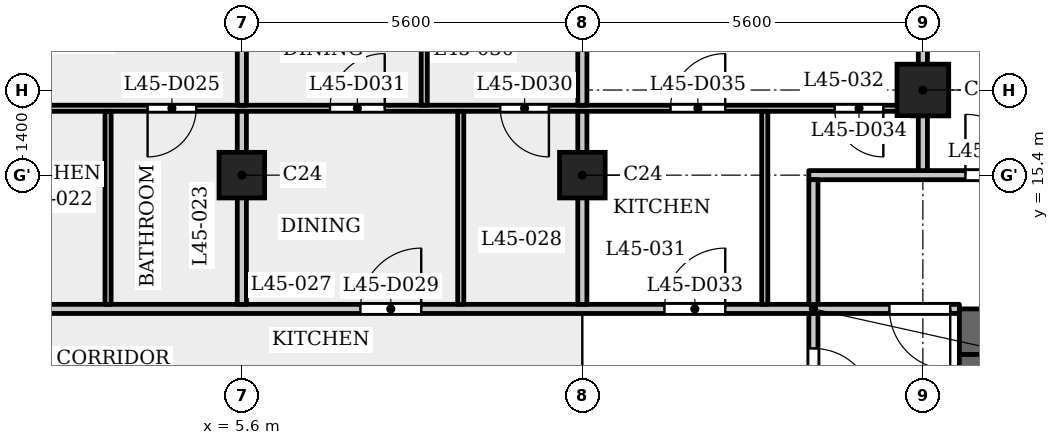
"""IFC4 building model, lengths in metres.
Left out: names, types, materials, properties, quantities, classifications, styles, units other than length and angle.
Written with IfcOpenShell. Run it as: python <this file> out.ifc"""

import sys

from ifc_helpers import new_model, si_unit, direction, frame, frame_2d, origin, origin_2d, place, context, subcontext, project, spatial, rectangle, extrude, element, fill, save


model = new_model("IFC4")
c1 = context("Model", 3, precision=1e-05, world=origin(), true_north=direction((0.0, 1.0)))
c2 = subcontext(c1, "Body", "Model", "MODEL_VIEW")
j1 = project(units=[si_unit("LENGTHUNIT", "METRE"), si_unit("PLANEANGLEUNIT", "RADIAN")], contexts=[c1])
p1 = place(None, origin())
s1 = spatial("IfcSite", under=j1, at=p1, CompositionType="ELEMENT")
p2 = place(p1, origin())
s2 = spatial("IfcBuilding", under=s1, at=p2, CompositionType="ELEMENT")
p3 = place(p2, frame((0.0, 0.0, 174.6)))
s3 = spatial("IfcBuildingStorey", under=s2, at=p3, CompositionType="ELEMENT", Elevation=174.6)
p4 = place(p3, frame((16.8, 16.8, 0.0), z_axis=(0.0, 0.0, 1.0), x_axis=(1.0, 0.0, 0.0)))
e1 = element("IfcColumn", 1, at=p4, inside=s3, PredefinedType="COLUMN", context=c2, shape_type="SweptSolid", body=[
    extrude(rectangle(XDim=0.85, YDim=0.85, at=origin_2d()), origin(), (0.0, 0.0, 1.0), 3.5),
])
for number, where, z_axis, x_axis in (
    (2, (5.6, 15.4, 0.0), (0.0, 0.0, 1.0), (1.0, 0.0, 0.0)),
    (3, (11.2, 15.4, 0.0), (0.0, 0.0, 1.0), (1.0, 0.0, 0.0)),
):
    element("IfcColumn", number, at=place(p3, frame(where, z_axis=z_axis, x_axis=x_axis)), inside=s3, PredefinedType="COLUMN", context=c2, shape_type="SweptSolid", body=[
        extrude(rectangle(XDim=0.75, YDim=0.75, at=origin_2d()), origin(), (0.0, 0.0, 1.0), 3.5),
    ])
p5 = place(p3, frame((17.4, 12.825, 0.0), z_axis=(0.0, 0.0, 1.0), x_axis=(1.0, 0.0, 0.0)))
e4 = element("IfcWall", 4, at=p5, inside=s3, PredefinedType="SHEAR", context=c2, shape_type="SweptSolid", body=[
    extrude(rectangle(XDim=10.4, YDim=0.75, at=frame_2d((5.2, 0.0))), origin(), (0.0, 0.0, 1.0), 3.15),
])
p6 = place(p3, frame((17.6, -12.45, 0.0), z_axis=(0.0, 0.0, 1.0), x_axis=(0.0, 1.0, 0.0)))
e5 = element("IfcWall", 5, at=p6, inside=s3, PredefinedType="SHEAR", context=c2, shape_type="SweptSolid", body=[
    extrude(rectangle(XDim=24.9, YDim=0.4, at=frame_2d((12.45, 0.0))), origin(), (0.0, 0.0, 1.0), 3.15),
])
p7 = place(p6, frame((8.65, 0.0, 0.0)))
e6 = element("IfcOpeningElement", 6, at=p7, cuts=e5, PredefinedType="OPENING", context=c2, shape_type="SweptSolid", body=[
    extrude(rectangle(XDim=0.9, YDim=2.1, at=frame_2d((0.45, 1.05))), frame((0.0, 0.21, 0.0), z_axis=(0.0, -1.0, 0.0), x_axis=(1.0, 0.0, 0.0)), (0.0, 0.0, 1.0), 0.42),
])
p8 = place(p6, frame((15.6, 0.0, 0.0)))
e7 = element("IfcOpeningElement", 7, at=p8, cuts=e5, PredefinedType="OPENING", context=c2, shape_type="SweptSolid", body=[
    extrude(rectangle(XDim=1.1, YDim=2.1, at=frame_2d((0.55, 1.05))), frame((0.0, 0.21, 0.0), z_axis=(0.0, -1.0, 0.0), x_axis=(1.0, 0.0, 0.0)), (0.0, 0.0, 1.0), 0.42),
])
p9 = place(p6, frame((18.0, 0.0, 0.0)))
e8 = element("IfcOpeningElement", 8, at=p9, cuts=e5, PredefinedType="OPENING", context=c2, shape_type="SweptSolid", body=[
    extrude(rectangle(XDim=1.1, YDim=2.1, at=frame_2d((0.55, 1.05))), frame((0.0, 0.21, 0.0), z_axis=(0.0, -1.0, 0.0), x_axis=(1.0, 0.0, 0.0)), (0.0, 0.0, 1.0), 0.42),
])
p10 = place(p6, frame((23.025, 0.0, 0.0)))
e9 = element("IfcOpeningElement", 9, at=p10, cuts=e5, PredefinedType="OPENING", context=c2, shape_type="SweptSolid", body=[
    extrude(rectangle(XDim=1.1, YDim=2.1, at=frame_2d((0.55, 1.05))), frame((0.0, 0.21, 0.0), z_axis=(0.0, -1.0, 0.0), x_axis=(1.0, 0.0, 0.0)), (0.0, 0.0, 1.0), 0.42),
])
p11 = place(p6, frame((0.775, 0.0, 0.0)))
e10 = element("IfcOpeningElement", 10, at=p11, cuts=e5, PredefinedType="OPENING", context=c2, shape_type="SweptSolid", body=[
    extrude(rectangle(XDim=1.1, YDim=2.1, at=frame_2d((0.55, 1.05))), frame((0.0, 0.21, 0.0), z_axis=(0.0, -1.0, 0.0), x_axis=(1.0, 0.0, 0.0)), (0.0, 0.0, 1.0), 0.42),
])
p12 = place(p6, frame((12.925, 0.0, 0.0)))
e11 = element("IfcOpeningElement", 11, at=p12, cuts=e5, PredefinedType="OPENING", context=c2, shape_type="SweptSolid", body=[
    extrude(rectangle(XDim=1.8, YDim=2.1, at=frame_2d((0.9, 1.05))), frame((0.0, 0.21, 0.0), z_axis=(0.0, -1.0, 0.0), x_axis=(1.0, 0.0, 0.0)), (0.0, 0.0, 1.0), 0.42),
])
p13 = place(p3, frame((-17.4, 13.2, 0.0), z_axis=(0.0, 0.0, 1.0), x_axis=(1.0, 0.0, 0.0)))
e12 = element("IfcWall", 12, at=p13, inside=s3, PredefinedType="PARTITIONING", context=c2, shape_type="SweptSolid", body=[
    extrude(rectangle(XDim=34.8, YDim=0.15, at=frame_2d((17.4, 0.0))), origin(), (0.0, 0.0, 1.0), 3.15),
])
p14 = place(p13, frame((0.25, 0.0, 0.0)))
e13 = element("IfcOpeningElement", 13, at=p14, cuts=e12, PredefinedType="OPENING", context=c2, shape_type="SweptSolid", body=[
    extrude(rectangle(XDim=1.0, YDim=2.1, at=frame_2d((0.5, 1.05))), frame((0.0, 0.085, 0.0), z_axis=(0.0, -1.0, 0.0), x_axis=(1.0, 0.0, 0.0)), (0.0, 0.0, 1.0), 0.17),
])
p15 = place(p13, frame((33.65, 0.0, 0.0)))
e14 = element("IfcOpeningElement", 14, at=p15, cuts=e12, PredefinedType="OPENING", context=c2, shape_type="SweptSolid", body=[
    extrude(rectangle(XDim=1.0, YDim=2.1, at=frame_2d((0.5, 1.05))), frame((0.0, 0.085, 0.0), z_axis=(0.0, -1.0, 0.0), x_axis=(1.0, 0.0, 0.0)), (0.0, 0.0, 1.0), 0.17),
])
p16 = place(p13, frame((10.15, 0.0, 0.0)))
e15 = element("IfcOpeningElement", 15, at=p16, cuts=e12, PredefinedType="OPENING", context=c2, shape_type="SweptSolid", body=[
    extrude(rectangle(XDim=1.0, YDim=2.1, at=frame_2d((0.5, 1.05))), frame((0.0, 0.085, 0.0), z_axis=(0.0, -1.0, 0.0), x_axis=(1.0, 0.0, 0.0)), (0.0, 0.0, 1.0), 0.17),
])
p17 = place(p13, frame((15.75, 0.0, 0.0)))
e16 = element("IfcOpeningElement", 16, at=p17, cuts=e12, PredefinedType="OPENING", context=c2, shape_type="SweptSolid", body=[
    extrude(rectangle(XDim=1.0, YDim=2.1, at=frame_2d((0.5, 1.05))), frame((0.0, 0.085, 0.0), z_axis=(0.0, -1.0, 0.0), x_axis=(1.0, 0.0, 0.0)), (0.0, 0.0, 1.0), 0.17),
])
p18 = place(p13, frame((24.95, 0.0, 0.0)))
e17 = element("IfcOpeningElement", 17, at=p18, cuts=e12, PredefinedType="OPENING", context=c2, shape_type="SweptSolid", body=[
    extrude(rectangle(XDim=1.0, YDim=2.1, at=frame_2d((0.5, 1.05))), frame((0.0, 0.085, 0.0), z_axis=(0.0, -1.0, 0.0), x_axis=(1.0, 0.0, 0.0)), (0.0, 0.0, 1.0), 0.17),
])
p19 = place(p13, frame((29.95, 0.0, 0.0)))
e18 = element("IfcOpeningElement", 18, at=p19, cuts=e12, PredefinedType="OPENING", context=c2, shape_type="SweptSolid", body=[
    extrude(rectangle(XDim=1.0, YDim=2.1, at=frame_2d((0.5, 1.05))), frame((0.0, 0.085, 0.0), z_axis=(0.0, -1.0, 0.0), x_axis=(1.0, 0.0, 0.0)), (0.0, 0.0, 1.0), 0.17),
])
p20 = place(p3, frame((14.925, 15.4, 0.0), z_axis=(0.0, 0.0, 1.0), x_axis=(1.0, 0.0, 0.0)))
e19 = element("IfcWall", 19, at=p20, inside=s3, PredefinedType="PARTITIONING", context=c2, shape_type="SweptSolid", body=[
    extrude(rectangle(XDim=12.559, YDim=0.15, at=frame_2d((6.279, 0.0))), origin(), (0.0, 0.0, 1.0), 3.15),
])
p21 = place(p20, frame((2.575, 0.0, 0.0)))
e20 = element("IfcOpeningElement", 20, at=p21, cuts=e19, PredefinedType="OPENING", context=c2, shape_type="SweptSolid", body=[
    extrude(rectangle(XDim=1.0, YDim=2.1, at=frame_2d((0.5, 1.05))), frame((0.0, 0.085, 0.0), z_axis=(0.0, -1.0, 0.0), x_axis=(1.0, 0.0, 0.0)), (0.0, 0.0, 1.0), 0.17),
])
p22 = place(p3, frame((-16.725, 16.5, 0.0), z_axis=(0.0, 0.0, 1.0), x_axis=(1.0, 0.0, 0.0)))
e21 = element("IfcWall", 21, at=p22, inside=s3, PredefinedType="PARTITIONING", context=c2, shape_type="SweptSolid", body=[
    extrude(rectangle(XDim=33.45, YDim=0.1, at=frame_2d((16.725, 0.0))), origin(), (0.0, 0.0, 1.0), 3.15),
])
p23 = place(p22, frame((0.575, 0.0, 0.0)))
e22 = element("IfcOpeningElement", 22, at=p23, cuts=e21, PredefinedType="OPENING", context=c2, shape_type="SweptSolid", body=[
    extrude(rectangle(XDim=0.8, YDim=2.1, at=frame_2d((0.4, 1.05))), frame((0.0, 0.06, 0.0), z_axis=(0.0, -1.0, 0.0), x_axis=(1.0, 0.0, 0.0)), (0.0, 0.0, 1.0), 0.12),
])
p24 = place(p22, frame((3.225, 0.0, 0.0)))
e23 = element("IfcOpeningElement", 23, at=p24, cuts=e21, PredefinedType="OPENING", context=c2, shape_type="SweptSolid", body=[
    extrude(rectangle(XDim=0.9, YDim=2.1, at=frame_2d((0.45, 1.05))), frame((0.0, 0.06, 0.0), z_axis=(0.0, -1.0, 0.0), x_axis=(1.0, 0.0, 0.0)), (0.0, 0.0, 1.0), 0.12),
])
p25 = place(p22, frame((6.775, 0.0, 0.0)))
e24 = element("IfcOpeningElement", 24, at=p25, cuts=e21, PredefinedType="OPENING", context=c2, shape_type="SweptSolid", body=[
    extrude(rectangle(XDim=0.9, YDim=2.1, at=frame_2d((0.45, 1.05))), frame((0.0, 0.06, 0.0), z_axis=(0.0, -1.0, 0.0), x_axis=(1.0, 0.0, 0.0)), (0.0, 0.0, 1.0), 0.12),
])
p26 = place(p22, frame((8.825, 0.0, 0.0)))
e25 = element("IfcOpeningElement", 25, at=p26, cuts=e21, PredefinedType="OPENING", context=c2, shape_type="SweptSolid", body=[
    extrude(rectangle(XDim=0.9, YDim=2.1, at=frame_2d((0.45, 1.05))), frame((0.0, 0.06, 0.0), z_axis=(0.0, -1.0, 0.0), x_axis=(1.0, 0.0, 0.0)), (0.0, 0.0, 1.0), 0.12),
])
p27 = place(p22, frame((20.775, 0.0, 0.0)))
e26 = element("IfcOpeningElement", 26, at=p27, cuts=e21, PredefinedType="OPENING", context=c2, shape_type="SweptSolid", body=[
    extrude(rectangle(XDim=0.8, YDim=2.1, at=frame_2d((0.4, 1.05))), frame((0.0, 0.06, 0.0), z_axis=(0.0, -1.0, 0.0), x_axis=(1.0, 0.0, 0.0)), (0.0, 0.0, 1.0), 0.12),
])
p28 = place(p22, frame((17.325, 0.0, 0.0)))
e27 = element("IfcOpeningElement", 27, at=p28, cuts=e21, PredefinedType="OPENING", context=c2, shape_type="SweptSolid", body=[
    extrude(rectangle(XDim=0.9, YDim=2.1, at=frame_2d((0.45, 1.05))), frame((0.0, 0.06, 0.0), z_axis=(0.0, -1.0, 0.0), x_axis=(1.0, 0.0, 0.0)), (0.0, 0.0, 1.0), 0.12),
])
p29 = place(p22, frame((12.375, 0.0, 0.0)))
e28 = element("IfcOpeningElement", 28, at=p29, cuts=e21, PredefinedType="OPENING", context=c2, shape_type="SweptSolid", body=[
    extrude(rectangle(XDim=0.9, YDim=2.1, at=frame_2d((0.45, 1.05))), frame((0.0, 0.06, 0.0), z_axis=(0.0, -1.0, 0.0), x_axis=(1.0, 0.0, 0.0)), (0.0, 0.0, 1.0), 0.12),
])
p30 = place(p22, frame((14.425, 0.0, 0.0)))
e29 = element("IfcOpeningElement", 29, at=p30, cuts=e21, PredefinedType="OPENING", context=c2, shape_type="SweptSolid", body=[
    extrude(rectangle(XDim=0.9, YDim=2.1, at=frame_2d((0.45, 1.05))), frame((0.0, 0.06, 0.0), z_axis=(0.0, -1.0, 0.0), x_axis=(1.0, 0.0, 0.0)), (0.0, 0.0, 1.0), 0.12),
])
p31 = place(p22, frame((26.575, 0.0, 0.0)))
e30 = element("IfcOpeningElement", 30, at=p31, cuts=e21, PredefinedType="OPENING", context=c2, shape_type="SweptSolid", body=[
    extrude(rectangle(XDim=0.8, YDim=2.1, at=frame_2d((0.4, 1.05))), frame((0.0, 0.06, 0.0), z_axis=(0.0, -1.0, 0.0), x_axis=(1.0, 0.0, 0.0)), (0.0, 0.0, 1.0), 0.12),
])
p32 = place(p22, frame((23.775, 0.0, 0.0)))
e31 = element("IfcOpeningElement", 31, at=p32, cuts=e21, PredefinedType="OPENING", context=c2, shape_type="SweptSolid", body=[
    extrude(rectangle(XDim=0.9, YDim=2.1, at=frame_2d((0.45, 1.05))), frame((0.0, 0.06, 0.0), z_axis=(0.0, -1.0, 0.0), x_axis=(1.0, 0.0, 0.0)), (0.0, 0.0, 1.0), 0.12),
])
p33 = place(p22, frame((32.075, 0.0, 0.0)))
e32 = element("IfcOpeningElement", 32, at=p33, cuts=e21, PredefinedType="OPENING", context=c2, shape_type="SweptSolid", body=[
    extrude(rectangle(XDim=0.8, YDim=2.1, at=frame_2d((0.4, 1.05))), frame((0.0, 0.06, 0.0), z_axis=(0.0, -1.0, 0.0), x_axis=(1.0, 0.0, 0.0)), (0.0, 0.0, 1.0), 0.12),
])
p34 = place(p22, frame((29.375, 0.0, 0.0)))
e33 = element("IfcOpeningElement", 33, at=p34, cuts=e21, PredefinedType="OPENING", context=c2, shape_type="SweptSolid", body=[
    extrude(rectangle(XDim=0.9, YDim=2.1, at=frame_2d((0.45, 1.05))), frame((0.0, 0.06, 0.0), z_axis=(0.0, -1.0, 0.0), x_axis=(1.0, 0.0, 0.0)), (0.0, 0.0, 1.0), 0.12),
])
p35 = place(p3, frame((3.4, 13.275, 0.0), z_axis=(0.0, 0.0, 1.0), x_axis=(0.0, 1.0, 0.0)))
e34 = element("IfcWall", 34, at=p35, inside=s3, PredefinedType="PARTITIONING", context=c2, shape_type="SweptSolid", body=[
    extrude(rectangle(XDim=3.175, YDim=0.1, at=frame_2d((1.587, 0.0))), origin(), (0.0, 0.0, 1.0), 3.15),
])
p36 = place(p3, frame((5.6, 13.275, 0.0), z_axis=(0.0, 0.0, 1.0), x_axis=(0.0, 1.0, 0.0)))
e35 = element("IfcWall", 35, at=p36, inside=s3, PredefinedType="PARTITIONING", context=c2, shape_type="SweptSolid", body=[
    extrude(rectangle(XDim=3.175, YDim=0.15, at=frame_2d((1.587, 0.0))), origin(), (0.0, 0.0, 1.0), 3.15),
])
p37 = place(p3, frame((5.6, 16.55, 0.0), z_axis=(0.0, 0.0, 1.0), x_axis=(0.0, 1.0, 0.0)))
e36 = element("IfcWall", 36, at=p37, inside=s3, PredefinedType="PARTITIONING", context=c2, shape_type="SweptSolid", body=[
    extrude(rectangle(XDim=6.33, YDim=0.15, at=frame_2d((3.165, 0.0))), origin(), (0.0, 0.0, 1.0), 3.15),
])
p38 = place(p3, frame((8.6, 16.55, 0.0), z_axis=(0.0, 0.0, 1.0), x_axis=(0.0, 1.0, 0.0)))
e37 = element("IfcWall", 37, at=p38, inside=s3, PredefinedType="PARTITIONING", context=c2, shape_type="SweptSolid", body=[
    extrude(rectangle(XDim=5.53, YDim=0.1, at=frame_2d((2.765, 0.0))), origin(), (0.0, 0.0, 1.0), 3.15),
])
p39 = place(p38, frame((4.35, 0.0, 0.0)))
e38 = element("IfcOpeningElement", 38, at=p39, cuts=e37, PredefinedType="OPENING", context=c2, shape_type="SweptSolid", body=[
    extrude(rectangle(XDim=0.9, YDim=2.1, at=frame_2d((0.45, 1.05))), frame((0.0, 0.06, 0.0), z_axis=(0.0, -1.0, 0.0), x_axis=(1.0, 0.0, 0.0)), (0.0, 0.0, 1.0), 0.12),
])
p40 = place(p3, frame((9.2, 13.275, 0.0), z_axis=(0.0, 0.0, 1.0), x_axis=(0.0, 1.0, 0.0)))
e39 = element("IfcWall", 39, at=p40, inside=s3, PredefinedType="PARTITIONING", context=c2, shape_type="SweptSolid", body=[
    extrude(rectangle(XDim=3.175, YDim=0.1, at=frame_2d((1.587, 0.0))), origin(), (0.0, 0.0, 1.0), 3.15),
])
p41 = place(p3, frame((11.2, 13.275, 0.0), z_axis=(0.0, 0.0, 1.0), x_axis=(0.0, 1.0, 0.0)))
e40 = element("IfcWall", 40, at=p41, inside=s3, PredefinedType="PARTITIONING", context=c2, shape_type="SweptSolid", body=[
    extrude(rectangle(XDim=3.175, YDim=0.15, at=frame_2d((1.587, 0.0))), origin(), (0.0, 0.0, 1.0), 3.15),
])
p42 = place(p3, frame((11.2, 16.55, 0.0), z_axis=(0.0, 0.0, 1.0), x_axis=(0.0, 1.0, 0.0)))
e41 = element("IfcWall", 41, at=p42, inside=s3, PredefinedType="PARTITIONING", context=c2, shape_type="SweptSolid", body=[
    extrude(rectangle(XDim=6.33, YDim=0.15, at=frame_2d((3.165, 0.0))), origin(), (0.0, 0.0, 1.0), 3.15),
])
p43 = place(p3, frame((14.2, 13.275, 0.0), z_axis=(0.0, 0.0, 1.0), x_axis=(0.0, 1.0, 0.0)))
e42 = element("IfcWall", 42, at=p43, inside=s3, PredefinedType="PARTITIONING", context=c2, shape_type="SweptSolid", body=[
    extrude(rectangle(XDim=3.175, YDim=0.1, at=frame_2d((1.587, 0.0))), origin(), (0.0, 0.0, 1.0), 3.15),
])
p44 = place(p3, frame((15.0, 6.769, 0.0), z_axis=(0.0, 0.0, 1.0), x_axis=(0.0, 1.0, 0.0)))
e43 = element("IfcWall", 43, at=p44, inside=s3, PredefinedType="PARTITIONING", context=c2, shape_type="SweptSolid", body=[
    extrude(rectangle(XDim=6.356, YDim=0.15, at=frame_2d((3.178, 0.0))), origin(), (0.0, 0.0, 1.0), 3.15),
])
p45 = place(p44, frame((4.781, 0.0, 0.0)))
e44 = element("IfcOpeningElement", 44, at=p45, cuts=e43, PredefinedType="OPENING", context=c2, shape_type="SweptSolid", body=[
    extrude(rectangle(XDim=1.0, YDim=2.1, at=frame_2d((0.5, 1.05))), frame((0.0, 0.085, 0.0), z_axis=(0.0, -1.0, 0.0), x_axis=(1.0, 0.0, 0.0)), (0.0, 0.0, 1.0), 0.17),
])
p46 = place(p3, frame((15.0, 13.275, 0.0), z_axis=(0.0, 0.0, 1.0), x_axis=(0.0, 1.0, 0.0)))
e45 = element("IfcWall", 45, at=p46, inside=s3, PredefinedType="PARTITIONING", context=c2, shape_type="SweptSolid", body=[
    extrude(rectangle(XDim=2.05, YDim=0.15, at=frame_2d((1.025, 0.0))), origin(), (0.0, 0.0, 1.0), 3.15),
])
p47 = place(p3, frame((16.8, 15.475, 0.0), z_axis=(0.0, 0.0, 1.0), x_axis=(0.0, 1.0, 0.0)))
e46 = element("IfcWall", 46, at=p47, inside=s3, PredefinedType="PARTITIONING", context=c2, shape_type="SweptSolid", body=[
    extrude(rectangle(XDim=7.405, YDim=0.15, at=frame_2d((3.702, 0.0))), origin(), (0.0, 0.0, 1.0), 3.15),
])
p48 = place(p45, origin())
e47 = element("IfcDoor", 47, at=p48, inside=s3, OperationType="SINGLE_SWING_LEFT", PredefinedType="DOOR", context=c2, shape_type="SweptSolid", body=[
    extrude(rectangle(XDim=1.0, YDim=2.1, at=frame_2d((0.5, 1.05))), frame((0.0, 0.025, 0.0), z_axis=(0.0, -1.0, 0.0), x_axis=(1.0, 0.0, 0.0)), (0.0, 0.0, 1.0), 0.05),
])
fill(e44, e47)
p49 = place(p15, origin())
e48 = element("IfcDoor", 48, at=p49, inside=s3, OperationType="SINGLE_SWING_RIGHT", PredefinedType="DOOR", context=c2, shape_type="SweptSolid", body=[
    extrude(rectangle(XDim=1.0, YDim=2.1, at=frame_2d((0.5, 1.05))), frame((0.0, 0.025, 0.0), z_axis=(0.0, -1.0, 0.0), x_axis=(1.0, 0.0, 0.0)), (0.0, 0.0, 1.0), 0.05),
])
fill(e14, e48)
p50 = place(p27, origin())
e49 = element("IfcDoor", 49, at=p50, inside=s3, OperationType="SINGLE_SWING_LEFT", PredefinedType="DOOR", context=c2, shape_type="SweptSolid", body=[
    extrude(rectangle(XDim=0.8, YDim=2.1, at=frame_2d((0.4, 1.05))), frame((0.0, 0.025, 0.0), z_axis=(0.0, -1.0, 0.0), x_axis=(1.0, 0.0, 0.0)), (0.0, 0.0, 1.0), 0.05),
])
fill(e26, e49)
p51 = place(p18, origin())
e50 = element("IfcDoor", 50, at=p51, inside=s3, OperationType="SINGLE_SWING_LEFT", PredefinedType="DOOR", context=c2, shape_type="SweptSolid", body=[
    extrude(rectangle(XDim=1.0, YDim=2.1, at=frame_2d((0.5, 1.05))), frame((0.0, 0.025, 0.0), z_axis=(0.0, -1.0, 0.0), x_axis=(1.0, 0.0, 0.0)), (0.0, 0.0, 1.0), 0.05),
])
fill(e17, e50)
p52 = place(p31, origin())
e51 = element("IfcDoor", 51, at=p52, inside=s3, OperationType="SINGLE_SWING_RIGHT", PredefinedType="DOOR", context=c2, shape_type="SweptSolid", body=[
    extrude(rectangle(XDim=0.8, YDim=2.1, at=frame_2d((0.4, 1.05))), frame((0.0, 0.025, 0.0), z_axis=(0.0, -1.0, 0.0), x_axis=(1.0, 0.0, 0.0)), (0.0, 0.0, 1.0), 0.05),
])
fill(e30, e51)
p53 = place(p32, origin())
e52 = element("IfcDoor", 52, at=p53, inside=s3, OperationType="SINGLE_SWING_LEFT", PredefinedType="DOOR", context=c2, shape_type="SweptSolid", body=[
    extrude(rectangle(XDim=0.9, YDim=2.1, at=frame_2d((0.45, 1.05))), frame((0.0, 0.025, 0.0), z_axis=(0.0, -1.0, 0.0), x_axis=(1.0, 0.0, 0.0)), (0.0, 0.0, 1.0), 0.05),
])
fill(e31, e52)
p54 = place(p19, origin())
e53 = element("IfcDoor", 53, at=p54, inside=s3, OperationType="SINGLE_SWING_LEFT", PredefinedType="DOOR", context=c2, shape_type="SweptSolid", body=[
    extrude(rectangle(XDim=1.0, YDim=2.1, at=frame_2d((0.5, 1.05))), frame((0.0, 0.025, 0.0), z_axis=(0.0, -1.0, 0.0), x_axis=(1.0, 0.0, 0.0)), (0.0, 0.0, 1.0), 0.05),
])
fill(e18, e53)
p55 = place(p33, origin())
e54 = element("IfcDoor", 54, at=p55, inside=s3, OperationType="SINGLE_SWING_RIGHT", PredefinedType="DOOR", context=c2, shape_type="SweptSolid", body=[
    extrude(rectangle(XDim=0.8, YDim=2.1, at=frame_2d((0.4, 1.05))), frame((0.0, 0.025, 0.0), z_axis=(0.0, -1.0, 0.0), x_axis=(1.0, 0.0, 0.0)), (0.0, 0.0, 1.0), 0.05),
])
fill(e32, e54)
p56 = place(p34, origin())
e55 = element("IfcDoor", 55, at=p56, inside=s3, OperationType="SINGLE_SWING_LEFT", PredefinedType="DOOR", context=c2, shape_type="SweptSolid", body=[
    extrude(rectangle(XDim=0.9, YDim=2.1, at=frame_2d((0.45, 1.05))), frame((0.0, 0.025, 0.0), z_axis=(0.0, -1.0, 0.0), x_axis=(1.0, 0.0, 0.0)), (0.0, 0.0, 1.0), 0.05),
])
fill(e33, e55)
p57 = place(p21, origin())
e56 = element("IfcDoor", 56, at=p57, inside=s3, OperationType="SINGLE_SWING_RIGHT", PredefinedType="DOOR", context=c2, shape_type="SweptSolid", body=[
    extrude(rectangle(XDim=1.0, YDim=2.1, at=frame_2d((0.5, 1.05))), frame((0.0, 0.025, 0.0), z_axis=(0.0, -1.0, 0.0), x_axis=(1.0, 0.0, 0.0)), (0.0, 0.0, 1.0), 0.05),
])
fill(e20, e56)
save(model, sys.argv[1])
